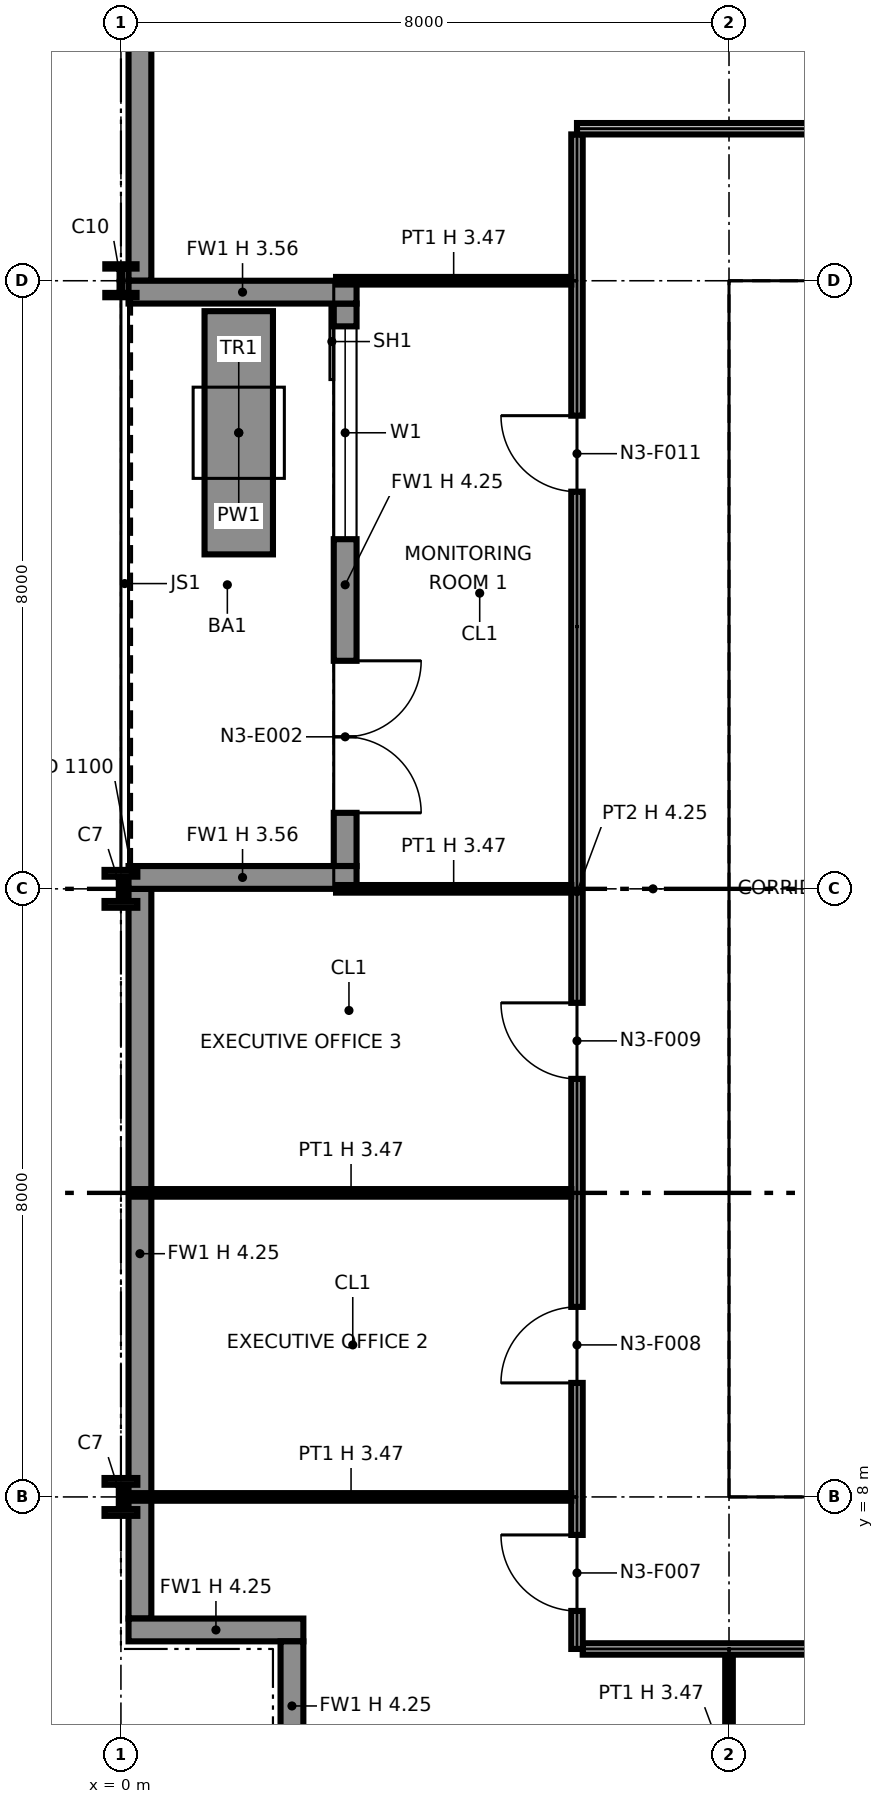
"""IFC4 building model, lengths in metres.
Left out: names, types, materials, properties, quantities, classifications, styles, units other than length and angle.
Written with IfcOpenShell. Run it as: python <this file> out.ifc"""

import sys

from ifc_helpers import new_model, si_unit, direction, frame, frame_2d, origin, origin_2d, place, context, subcontext, project, spatial, polyline, rectangle, i_section, outline, extrude, element, fill, save


model = new_model("IFC4")
c1 = context("Model", 3, precision=1e-05, world=origin(), true_north=direction((0.0, 1.0)))
c2 = subcontext(c1, "Body", "Model", "MODEL_VIEW")
j1 = project(units=[si_unit("LENGTHUNIT", "METRE"), si_unit("PLANEANGLEUNIT", "RADIAN")], contexts=[c1])
p1 = place(None, origin())
s1 = spatial("IfcSite", under=j1, at=p1, CompositionType="ELEMENT")
p2 = place(p1, origin())
s2 = spatial("IfcBuilding", under=s1, at=p2, CompositionType="ELEMENT")
p3 = place(p2, frame((0.0, 0.0, 70.0)))
s3 = spatial("IfcBuildingStorey", under=s2, at=p3, CompositionType="ELEMENT", Elevation=70.0)
for number, where, z_axis, x_axis in (
    (1, (0.0, 8.0, 0.0), (0.0, 0.0, 1.0), (1.0, 0.0, 0.0)),
    (2, (0.0, 16.0, 0.0), (0.0, 0.0, 1.0), (1.0, 0.0, 0.0)),
):
    element("IfcColumn", number, at=place(p3, frame(where, z_axis=z_axis, x_axis=x_axis)), inside=s3, PredefinedType="COLUMN", context=c2, shape_type="SweptSolid", body=[
        extrude(i_section(OverallWidth=0.432, OverallDepth=0.498, WebThickness=0.056, FlangeThickness=0.089, at=origin_2d()), origin(), (0.0, 0.0, 1.0), 4.25),
    ])
p4 = place(p3, frame((0.0, 24.0, 0.0), z_axis=(0.0, 0.0, 1.0), x_axis=(1.0, 0.0, 0.0)))
e3 = element("IfcColumn", 3, at=p4, inside=s3, PredefinedType="COLUMN", context=c2, shape_type="SweptSolid", body=[
    extrude(i_section(OverallWidth=0.411, OverallDepth=0.434, WebThickness=0.036, FlangeThickness=0.057, at=origin_2d()), origin(), (0.0, 0.0, 1.0), 4.25),
])
for number, where, z_axis, x_axis in (
    (4, (8.0, 8.0, 0.0), (0.0, 0.0, 1.0), (1.0, 0.0, 0.0)),
    (5, (8.0, 16.0, 0.0), (0.0, 0.0, 1.0), (1.0, 0.0, 0.0)),
):
    element("IfcColumn", number, at=place(p3, frame(where, z_axis=z_axis, x_axis=x_axis)), inside=s3, PredefinedType="COLUMN", context=c2, shape_type="SweptSolid", body=[
        extrude(i_section(OverallWidth=0.406, OverallDepth=0.417, WebThickness=0.03, FlangeThickness=0.048, at=origin_2d()), origin(), (0.0, 0.0, 1.0), 4.25),
    ])
p5 = place(p3, frame((8.0, 24.0, 0.0), z_axis=(0.0, 0.0, 1.0), x_axis=(1.0, 0.0, 0.0)))
e6 = element("IfcColumn", 6, at=p5, inside=s3, PredefinedType="COLUMN", context=c2, shape_type="SweptSolid", body=[
    extrude(i_section(OverallWidth=0.411, OverallDepth=0.434, WebThickness=0.036, FlangeThickness=0.057, at=origin_2d()), origin(), (0.0, 0.0, 1.0), 4.25),
])
p6 = place(p3, frame((0.25, 32.0, 0.0), z_axis=(0.0, 0.0, 1.0), x_axis=(0.0, -1.0, 0.0)))
e7 = element("IfcWall", 7, at=p6, inside=s3, PredefinedType="SOLIDWALL", context=c2, shape_type="SweptSolid", body=[
    extrude(rectangle(XDim=8.0, YDim=0.3, at=frame_2d((4.0, 0.0))), origin(), (0.0, 0.0, 1.0), 4.25),
])
p7 = place(p3, frame((2.95, 23.7, 0.0), z_axis=(0.0, 0.0, 1.0), x_axis=(0.0, -1.0, 0.0)))
e8 = element("IfcWall", 8, at=p7, inside=s3, PredefinedType="SOLIDWALL", context=c2, shape_type="SweptSolid", body=[
    extrude(rectangle(XDim=7.4, YDim=0.3, at=frame_2d((3.7, 0.0))), origin(), (0.0, 0.0, 1.0), 4.25),
])
p8 = place(p7, frame((0.3, 0.0, 0.9)))
e9 = element("IfcOpeningElement", 9, at=p8, cuts=e8, PredefinedType="OPENING", context=c2, shape_type="SweptSolid", body=[
    extrude(rectangle(XDim=2.8, YDim=2.2, at=frame_2d((1.4, 1.1))), frame((0.0, 0.16, 0.0), z_axis=(0.0, -1.0, 0.0), x_axis=(1.0, 0.0, 0.0)), (0.0, 0.0, 1.0), 0.32),
])
p9 = place(p7, frame((4.7, 0.0, 0.0)))
e10 = element("IfcOpeningElement", 10, at=p9, cuts=e8, PredefinedType="OPENING", context=c2, shape_type="SweptSolid", body=[
    extrude(rectangle(XDim=2.0, YDim=2.4, at=frame_2d((1.0, 1.2))), frame((0.0, 0.16, 0.0), z_axis=(0.0, -1.0, 0.0), x_axis=(1.0, 0.0, 0.0)), (0.0, 0.0, 1.0), 0.32),
])
for number, where, z_axis, x_axis in (
    (11, (0.1, 23.85, 0.0), (0.0, 0.0, 1.0), (1.0, 0.0, 0.0)),
    (12, (0.1, 16.15, 0.0), (0.0, 0.0, 1.0), (1.0, 0.0, 0.0)),
):
    element("IfcWall", number, at=place(p3, frame(where, z_axis=z_axis, x_axis=x_axis)), inside=s3, PredefinedType="SOLIDWALL", context=c2, shape_type="SweptSolid", body=[
        extrude(rectangle(XDim=3.0, YDim=0.3, at=frame_2d((1.5, 0.0))), origin(), (0.0, 0.0, 1.0), 3.556),
    ])
p10 = place(p3, frame((0.25, 16.0, 0.0), z_axis=(0.0, 0.0, 1.0), x_axis=(0.0, -1.0, 0.0)))
e13 = element("IfcWall", 13, at=p10, inside=s3, PredefinedType="SOLIDWALL", context=c2, shape_type="SweptSolid", body=[
    extrude(rectangle(XDim=9.6, YDim=0.3, at=frame_2d((4.8, 0.0))), origin(), (0.0, 0.0, 1.0), 4.25),
])
p11 = place(p3, frame((1.55, 23.6, 0.0), z_axis=(0.0, 0.0, 1.0), x_axis=(0.0, -1.0, 0.0)))
e14 = element("IfcWall", 14, at=p11, inside=s3, PredefinedType="SOLIDWALL", context=c2, shape_type="SweptSolid", body=[
    extrude(rectangle(XDim=3.2, YDim=0.9, at=frame_2d((1.6, 0.0))), origin(), (0.0, 0.0, 1.0), 0.6),
])
p12 = place(p3, frame((0.1, 6.25, 0.0), z_axis=(0.0, 0.0, 1.0), x_axis=(1.0, 0.0, 0.0)))
e15 = element("IfcWall", 15, at=p12, inside=s3, PredefinedType="SOLIDWALL", context=c2, shape_type="SweptSolid", body=[
    extrude(rectangle(XDim=2.3, YDim=0.3, at=frame_2d((1.15, 0.0))), origin(), (0.0, 0.0, 1.0), 4.25),
])
p13 = place(p3, frame((2.25, 6.1, 0.0), z_axis=(0.0, 0.0, 1.0), x_axis=(0.0, -1.0, 0.0)))
e16 = element("IfcWall", 16, at=p13, inside=s3, PredefinedType="SOLIDWALL", context=c2, shape_type="SweptSolid", body=[
    extrude(rectangle(XDim=1.7, YDim=0.3, at=frame_2d((0.85, 0.0))), origin(), (0.0, 0.0, 1.0), 4.25),
])
p14 = place(p3, frame((8.65, 8.75, 0.0), z_axis=(0.0, 0.0, 1.0), x_axis=(1.0, 0.0, 0.0)))
e17 = element("IfcWall", 17, at=p14, inside=s3, PredefinedType="PARTITIONING", context=c2, shape_type="SweptSolid", body=[
    extrude(outline(polyline([(0.0, 0.0), (14.7, 0.0), (14.7, 4.25), (7.469, 4.25), (7.469, 3.632), (7.231, 3.632), (7.23, 4.25), (0.0, 4.25), (0.0, 0.0)])), frame((0.0, 0.1, 0.0), z_axis=(0.0, -1.0, 0.0), x_axis=(1.0, 0.0, 0.0)), (0.0, 0.0, 1.0), 0.2),
])
p15 = place(p14, frame((1.3, 0.0, 0.0)))
e18 = element("IfcOpeningElement", 18, at=p15, cuts=e17, PredefinedType="OPENING", context=c2, shape_type="SweptSolid", body=[
    extrude(rectangle(XDim=1.4, YDim=2.1, at=frame_2d((0.7, 1.05))), frame((0.0, 0.11, 0.0), z_axis=(0.0, -1.0, 0.0), x_axis=(1.0, 0.0, 0.0)), (0.0, 0.0, 1.0), 0.22),
])
p16 = place(p14, frame((4.6, 0.0, 0.0)))
e19 = element("IfcOpeningElement", 19, at=p16, cuts=e17, PredefinedType="OPENING", context=c2, shape_type="SweptSolid", body=[
    extrude(rectangle(XDim=1.4, YDim=2.1, at=frame_2d((0.7, 1.05))), frame((0.0, 0.11, 0.0), z_axis=(0.0, -1.0, 0.0), x_axis=(1.0, 0.0, 0.0)), (0.0, 0.0, 1.0), 0.22),
])
p17 = place(p14, frame((10.4, 0.0, 0.0)))
e20 = element("IfcOpeningElement", 20, at=p17, cuts=e17, PredefinedType="OPENING", context=c2, shape_type="SweptSolid", body=[
    extrude(rectangle(XDim=1.2, YDim=2.1, at=frame_2d((0.6, 1.05))), frame((0.0, 0.11, 0.0), z_axis=(0.0, -1.0, 0.0), x_axis=(1.0, 0.0, 0.0)), (0.0, 0.0, 1.0), 0.22),
])
p18 = place(p3, frame((8.75, 8.85, 0.0), z_axis=(0.0, 0.0, 1.0), x_axis=(0.0, 1.0, 0.0)))
e21 = element("IfcWall", 21, at=p18, inside=s3, PredefinedType="PARTITIONING", context=c2, shape_type="SweptSolid", body=[
    extrude(outline(polyline([(0.0, 0.0), (14.3, 0.0), (14.3, 4.25), (10.231, 4.25), (10.23, 3.789), (10.07, 3.789), (10.069, 4.25), (7.27, 4.25), (7.269, 3.632), (7.031, 3.632), (7.031, 4.25), (0.0, 4.25), (0.0, 0.0)])), frame((0.0, 0.1, 0.0), z_axis=(0.0, -1.0, 0.0), x_axis=(1.0, 0.0, 0.0)), (0.0, 0.0, 1.0), 0.2),
])
p19 = place(p18, frame((8.3, 0.0, 0.0)))
e22 = element("IfcOpeningElement", 22, at=p19, cuts=e21, PredefinedType="OPENING", context=c2, shape_type="SweptSolid", body=[
    extrude(rectangle(XDim=1.8, YDim=2.1, at=frame_2d((0.9, 1.05))), frame((0.0, 0.11, 0.0), z_axis=(0.0, -1.0, 0.0), x_axis=(1.0, 0.0, 0.0)), (0.0, 0.0, 1.0), 0.22),
])
p20 = place(p3, frame((8.65, 23.25, 0.0), z_axis=(0.0, 0.0, 1.0), x_axis=(1.0, 0.0, 0.0)))
e23 = element("IfcWall", 23, at=p20, inside=s3, PredefinedType="PARTITIONING", context=c2, shape_type="SweptSolid", body=[
    extrude(outline(polyline([(0.0, 0.0), (14.7, 0.0), (14.7, 4.25), (7.469, 4.25), (7.469, 3.632), (7.231, 3.632), (7.23, 4.25), (0.0, 4.25), (0.0, 0.0)])), frame((0.0, 0.1, 0.0), z_axis=(0.0, -1.0, 0.0), x_axis=(1.0, 0.0, 0.0)), (0.0, 0.0, 1.0), 0.2),
])
p21 = place(p3, frame((8.85, 16.0, 0.0), z_axis=(0.0, 0.0, 1.0), x_axis=(1.0, 0.0, 0.0)))
e24 = element("IfcWall", 24, at=p21, inside=s3, PredefinedType="PARTITIONING", context=c2, shape_type="SweptSolid", body=[
    extrude(rectangle(XDim=6.931, YDim=0.6, at=frame_2d((3.466, 0.0))), origin(), (0.0, 0.0, 1.0), 3.632),
])
p22 = place(p3, frame((8.85, 19.9, 0.0), z_axis=(0.0, 0.0, 1.0), x_axis=(1.0, 0.0, 0.0)))
e25 = element("IfcWall", 25, at=p22, inside=s3, PredefinedType="PARTITIONING", context=c2, shape_type="SweptSolid", body=[
    extrude(outline(polyline([(0.0, 0.0), (14.3, 0.0), (14.3, 3.789), (7.27, 3.789), (7.269, 3.632), (7.031, 3.632), (7.031, 4.25), (0.0, 4.25), (0.0, 0.0)])), frame((0.0, 0.1, 0.0), z_axis=(0.0, -1.0, 0.0), x_axis=(1.0, 0.0, 0.0)), (0.0, 0.0, 1.0), 0.2),
])
p23 = place(p22, frame((6.9, 0.0, 0.0)))
e26 = element("IfcOpeningElement", 26, at=p23, cuts=e25, PredefinedType="OPENING", context=c2, shape_type="SweptSolid", body=[
    extrude(rectangle(XDim=0.9, YDim=2.1, at=frame_2d((0.45, 1.05))), frame((0.0, 0.11, 0.0), z_axis=(0.0, -1.0, 0.0), x_axis=(1.0, 0.0, 0.0)), (0.0, 0.0, 1.0), 0.22),
])
p24 = place(p22, frame((9.95, 0.0, 0.0)))
e27 = element("IfcOpeningElement", 27, at=p24, cuts=e25, PredefinedType="OPENING", context=c2, shape_type="SweptSolid", body=[
    extrude(rectangle(XDim=0.9, YDim=2.1, at=frame_2d((0.45, 1.05))), frame((0.0, 0.11, 0.0), z_axis=(0.0, -1.0, 0.0), x_axis=(1.0, 0.0, 0.0)), (0.0, 0.0, 1.0), 0.22),
])
p25 = place(p22, frame((12.45, 0.0, 0.0)))
e28 = element("IfcOpeningElement", 28, at=p25, cuts=e25, PredefinedType="OPENING", context=c2, shape_type="SweptSolid", body=[
    extrude(rectangle(XDim=0.9, YDim=2.1, at=frame_2d((0.45, 1.05))), frame((0.0, 0.11, 0.0), z_axis=(0.0, -1.0, 0.0), x_axis=(1.0, 0.0, 0.0)), (0.0, 0.0, 1.0), 0.22),
])
p26 = place(p3, frame((8.0, 2.83, 0.0), z_axis=(0.0, 0.0, 1.0), x_axis=(0.0, 1.0, 0.0)))
e29 = element("IfcWall", 29, at=p26, inside=s3, PredefinedType="PARTITIONING", context=c2, shape_type="SweptSolid", body=[
    extrude(rectangle(XDim=3.095, YDim=0.1, at=frame_2d((1.547, 0.0))), origin(), (0.0, 0.0, 1.0), 3.47),
])
p27 = place(p3, frame((6.075, 6.0, 0.0), z_axis=(0.0, 0.0, 1.0), x_axis=(1.0, 0.0, 0.0)))
e30 = element("IfcWall", 30, at=p27, inside=s3, PredefinedType="PARTITIONING", context=c2, shape_type="SweptSolid", body=[
    extrude(rectangle(XDim=19.85, YDim=0.15, at=frame_2d((9.925, 0.0))), origin(), (0.0, 0.0, 1.0), 4.25),
])
p28 = place(p27, frame((12.425, 0.0, 0.0), z_axis=(0.0, 0.0, 1.0), x_axis=(-1.0, 0.0, 0.0)))
e31 = element("IfcOpeningElement", 31, at=p28, cuts=e30, PredefinedType="OPENING", context=c2, shape_type="SweptSolid", body=[
    extrude(rectangle(XDim=1.0, YDim=2.1, at=frame_2d((0.5, 1.05))), frame((0.0, 0.085, 0.0), z_axis=(0.0, -1.0, 0.0), x_axis=(1.0, 0.0, 0.0)), (0.0, 0.0, 1.0), 0.17),
])
p29 = place(p27, frame((16.425, 0.0, 0.0), z_axis=(0.0, 0.0, 1.0), x_axis=(-1.0, 0.0, 0.0)))
e32 = element("IfcOpeningElement", 32, at=p29, cuts=e30, PredefinedType="OPENING", context=c2, shape_type="SweptSolid", body=[
    extrude(rectangle(XDim=1.0, YDim=2.1, at=frame_2d((0.5, 1.05))), frame((0.0, 0.085, 0.0), z_axis=(0.0, -1.0, 0.0), x_axis=(1.0, 0.0, 0.0)), (0.0, 0.0, 1.0), 0.17),
])
p30 = place(p27, frame((4.425, 0.0, 0.0), z_axis=(0.0, 0.0, 1.0), x_axis=(-1.0, 0.0, 0.0)))
e33 = element("IfcOpeningElement", 33, at=p30, cuts=e30, PredefinedType="OPENING", context=c2, shape_type="SweptSolid", body=[
    extrude(rectangle(XDim=1.0, YDim=2.1, at=frame_2d((0.5, 1.05))), frame((0.0, 0.085, 0.0), z_axis=(0.0, -1.0, 0.0), x_axis=(1.0, 0.0, 0.0)), (0.0, 0.0, 1.0), 0.17),
])
p31 = place(p27, frame((8.425, 0.0, 0.0), z_axis=(0.0, 0.0, 1.0), x_axis=(-1.0, 0.0, 0.0)))
e34 = element("IfcOpeningElement", 34, at=p31, cuts=e30, PredefinedType="OPENING", context=c2, shape_type="SweptSolid", body=[
    extrude(rectangle(XDim=1.0, YDim=2.1, at=frame_2d((0.5, 1.05))), frame((0.0, 0.085, 0.0), z_axis=(0.0, -1.0, 0.0), x_axis=(1.0, 0.0, 0.0)), (0.0, 0.0, 1.0), 0.17),
])
p32 = place(p27, frame((19.425, 0.0, 0.0), z_axis=(0.0, 0.0, 1.0), x_axis=(-1.0, 0.0, 0.0)))
e35 = element("IfcOpeningElement", 35, at=p32, cuts=e30, PredefinedType="OPENING", context=c2, shape_type="SweptSolid", body=[
    extrude(rectangle(XDim=1.0, YDim=2.1, at=frame_2d((0.5, 1.05))), frame((0.0, 0.085, 0.0), z_axis=(0.0, -1.0, 0.0), x_axis=(1.0, 0.0, 0.0)), (0.0, 0.0, 1.0), 0.17),
])
p33 = place(p3, frame((6.0, 6.0, 0.0), z_axis=(0.0, 0.0, 1.0), x_axis=(0.0, 1.0, 0.0)))
e36 = element("IfcWall", 36, at=p33, inside=s3, PredefinedType="PARTITIONING", context=c2, shape_type="SweptSolid", body=[
    extrude(outline(polyline([(0.0, 0.0), (19.925, 0.0), (19.925, 4.25), (18.3, 4.25), (18.298, 3.47), (17.702, 3.47), (17.7, 4.25), (14.3, 4.25), (14.298, 3.47), (13.702, 3.47), (13.7, 4.25), (10.3, 4.25), (10.298, 3.47), (9.702, 3.47), (9.7, 4.25), (6.3, 4.25), (6.298, 3.47), (5.702, 3.47), (5.7, 4.25), (2.3, 4.25), (2.298, 3.47), (1.702, 3.47), (1.7, 4.25), (0.0, 4.25), (0.0, 0.0)])), frame((0.0, 0.075, 0.0), z_axis=(0.0, -1.0, 0.0), x_axis=(1.0, 0.0, 0.0)), (0.0, 0.0, 1.0), 0.15),
])
p34 = place(p33, frame((0.5, 0.0, 0.0)))
e37 = element("IfcOpeningElement", 37, at=p34, cuts=e36, PredefinedType="OPENING", context=c2, shape_type="SweptSolid", body=[
    extrude(rectangle(XDim=1.0, YDim=2.1, at=frame_2d((0.5, 1.05))), frame((0.0, 0.085, 0.0), z_axis=(0.0, -1.0, 0.0), x_axis=(1.0, 0.0, 0.0)), (0.0, 0.0, 1.0), 0.17),
])
p35 = place(p33, frame((3.5, 0.0, 0.0)))
e38 = element("IfcOpeningElement", 38, at=p35, cuts=e36, PredefinedType="OPENING", context=c2, shape_type="SweptSolid", body=[
    extrude(rectangle(XDim=1.0, YDim=2.1, at=frame_2d((0.5, 1.05))), frame((0.0, 0.085, 0.0), z_axis=(0.0, -1.0, 0.0), x_axis=(1.0, 0.0, 0.0)), (0.0, 0.0, 1.0), 0.17),
])
p36 = place(p33, frame((7.5, 0.0, 0.0)))
e39 = element("IfcOpeningElement", 39, at=p36, cuts=e36, PredefinedType="OPENING", context=c2, shape_type="SweptSolid", body=[
    extrude(rectangle(XDim=1.0, YDim=2.1, at=frame_2d((0.5, 1.05))), frame((0.0, 0.085, 0.0), z_axis=(0.0, -1.0, 0.0), x_axis=(1.0, 0.0, 0.0)), (0.0, 0.0, 1.0), 0.17),
])
p37 = place(p33, frame((15.225, 0.0, 0.0)))
e40 = element("IfcOpeningElement", 40, at=p37, cuts=e36, PredefinedType="OPENING", context=c2, shape_type="SweptSolid", body=[
    extrude(rectangle(XDim=1.0, YDim=2.1, at=frame_2d((0.5, 1.05))), frame((0.0, 0.085, 0.0), z_axis=(0.0, -1.0, 0.0), x_axis=(1.0, 0.0, 0.0)), (0.0, 0.0, 1.0), 0.17),
])
for number, where, z_axis, x_axis in (
    (41, (0.13, 8.0, 0.0), (0.0, 0.0, 1.0), (1.0, 0.0, 0.0)),
    (42, (0.13, 12.0, 0.0), (0.0, 0.0, 1.0), (1.0, 0.0, 0.0)),
):
    element("IfcWall", number, at=place(p3, frame(where, z_axis=z_axis, x_axis=x_axis)), inside=s3, PredefinedType="PARTITIONING", context=c2, shape_type="SweptSolid", body=[
        extrude(rectangle(XDim=5.795, YDim=0.1, at=frame_2d((2.897, 0.0))), origin(), (0.0, 0.0, 1.0), 3.47),
    ])
for number, where, z_axis, x_axis in (
    (43, (2.83, 16.0, 0.0), (0.0, 0.0, 1.0), (1.0, 0.0, 0.0)),
    (44, (2.83, 24.0, 0.0), (0.0, 0.0, 1.0), (1.0, 0.0, 0.0)),
):
    element("IfcWall", number, at=place(p3, frame(where, z_axis=z_axis, x_axis=x_axis)), inside=s3, PredefinedType="PARTITIONING", context=c2, shape_type="SweptSolid", body=[
        extrude(rectangle(XDim=3.095, YDim=0.1, at=frame_2d((1.547, 0.0))), origin(), (0.0, 0.0, 1.0), 3.47),
    ])
p38 = place(p3, frame((6.0, 26.0, 0.0), z_axis=(0.0, 0.0, 1.0), x_axis=(1.0, 0.0, 0.0)))
e45 = element("IfcWall", 45, at=p38, inside=s3, PredefinedType="PARTITIONING", context=c2, shape_type="SweptSolid", body=[
    extrude(rectangle(XDim=17.925, YDim=0.15, at=frame_2d((8.962, 0.0))), origin(), (0.0, 0.0, 1.0), 4.25),
])
p39 = place(p38, frame((5.1, 0.0, 0.0)))
e46 = element("IfcOpeningElement", 46, at=p39, cuts=e45, PredefinedType="OPENING", context=c2, shape_type="SweptSolid", body=[
    extrude(rectangle(XDim=1.8, YDim=2.1, at=frame_2d((0.9, 1.05))), frame((0.0, 0.085, 0.0), z_axis=(0.0, -1.0, 0.0), x_axis=(1.0, 0.0, 0.0)), (0.0, 0.0, 1.0), 0.17),
])
p40 = place(p8, origin())
e47 = element("IfcWindow", 47, at=p40, inside=s3, PartitioningType="SINGLE_PANEL", PredefinedType="WINDOW", context=c2, shape_type="SweptSolid", body=[
    extrude(rectangle(XDim=2.8, YDim=2.2, at=frame_2d((1.4, 1.1))), frame((0.0, 0.03, 0.0), z_axis=(0.0, -1.0, 0.0), x_axis=(1.0, 0.0, 0.0)), (0.0, 0.0, 1.0), 0.06),
])
fill(e9, e47)
p41 = place(p9, origin())
e48 = element("IfcDoor", 48, at=p41, inside=s3, OperationType="DOUBLE_DOOR_SINGLE_SWING", PredefinedType="DOOR", context=c2, shape_type="SweptSolid", body=[
    extrude(rectangle(XDim=2.0, YDim=2.4, at=frame_2d((1.0, 1.2))), frame((0.0, 0.025, 0.0), z_axis=(0.0, -1.0, 0.0), x_axis=(1.0, 0.0, 0.0)), (0.0, 0.0, 1.0), 0.05),
])
fill(e10, e48)
p42 = place(p19, origin())
e49 = element("IfcDoor", 49, at=p42, inside=s3, OperationType="DOUBLE_DOOR_SINGLE_SWING", PredefinedType="NOTDEFINED", context=c2, shape_type="SweptSolid", body=[
    extrude(rectangle(XDim=1.8, YDim=2.1, at=frame_2d((0.9, 1.05))), frame((0.0, 0.025, 0.0), z_axis=(0.0, -1.0, 0.0), x_axis=(1.0, 0.0, 0.0)), (0.0, 0.0, 1.0), 0.05),
])
fill(e22, e49)
p43 = place(p34, origin())
e50 = element("IfcDoor", 50, at=p43, inside=s3, OperationType="SINGLE_SWING_RIGHT", PredefinedType="DOOR", context=c2, shape_type="SweptSolid", body=[
    extrude(rectangle(XDim=1.0, YDim=2.1, at=frame_2d((0.5, 1.05))), frame((0.0, 0.025, 0.0), z_axis=(0.0, -1.0, 0.0), x_axis=(1.0, 0.0, 0.0)), (0.0, 0.0, 1.0), 0.05),
])
fill(e37, e50)
p44 = place(p35, origin())
e51 = element("IfcDoor", 51, at=p44, inside=s3, OperationType="SINGLE_SWING_LEFT", PredefinedType="DOOR", context=c2, shape_type="SweptSolid", body=[
    extrude(rectangle(XDim=1.0, YDim=2.1, at=frame_2d((0.5, 1.05))), frame((0.0, 0.025, 0.0), z_axis=(0.0, -1.0, 0.0), x_axis=(1.0, 0.0, 0.0)), (0.0, 0.0, 1.0), 0.05),
])
fill(e38, e51)
p45 = place(p36, origin())
e52 = element("IfcDoor", 52, at=p45, inside=s3, OperationType="SINGLE_SWING_RIGHT", PredefinedType="DOOR", context=c2, shape_type="SweptSolid", body=[
    extrude(rectangle(XDim=1.0, YDim=2.1, at=frame_2d((0.5, 1.05))), frame((0.0, 0.025, 0.0), z_axis=(0.0, -1.0, 0.0), x_axis=(1.0, 0.0, 0.0)), (0.0, 0.0, 1.0), 0.05),
])
fill(e39, e52)
p46 = place(p37, origin())
e53 = element("IfcDoor", 53, at=p46, inside=s3, OperationType="SINGLE_SWING_RIGHT", PredefinedType="DOOR", context=c2, shape_type="SweptSolid", body=[
    extrude(rectangle(XDim=1.0, YDim=2.1, at=frame_2d((0.5, 1.05))), frame((0.0, 0.025, 0.0), z_axis=(0.0, -1.0, 0.0), x_axis=(1.0, 0.0, 0.0)), (0.0, 0.0, 1.0), 0.05),
])
fill(e40, e53)
save(model, sys.argv[1])
